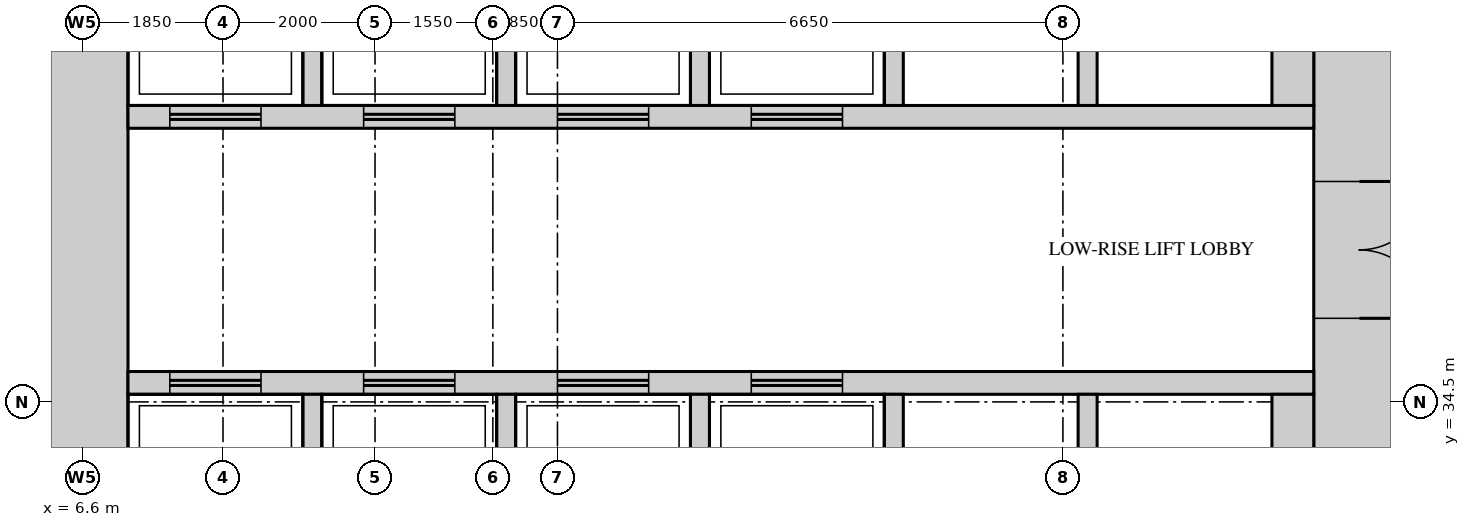
"""IFC4 building model, lengths in metres.
Left out: names, types, materials, properties, quantities, classifications, styles, units other than length and angle.
Written with IfcOpenShell. Run it as: python <this file> out.ifc"""

import sys

from ifc_helpers import new_model, si_unit, direction, frame, frame_2d, origin, place, context, subcontext, project, spatial, rectangle, extrude, source, transform, mapped, element, fill, save


model = new_model("IFC4")
c1 = context("Model", 3, precision=1e-05, world=origin(), true_north=direction((0.0, 1.0)))
c2 = subcontext(c1, "Body", "Model", "MODEL_VIEW")
j1 = project(units=[si_unit("LENGTHUNIT", "METRE"), si_unit("PLANEANGLEUNIT", "RADIAN")], contexts=[c1])
p1 = place(None, origin())
s1 = spatial("IfcSite", under=j1, at=p1, CompositionType="ELEMENT")
p2 = place(p1, origin())
s2 = spatial("IfcBuilding", under=s1, at=p2, CompositionType="ELEMENT")
p3 = place(p2, frame((0.0, 0.0, 37.5)))
s3 = spatial("IfcBuildingStorey", under=s2, at=p3, CompositionType="ELEMENT", Elevation=37.5)
m1 = source(origin(), c2, "Body", "SweptSolid", [
    extrude(rectangle(XDim=27.6, YDim=1.2, at=frame_2d((13.8, 0.0))), origin(), (0.0, 0.0, 1.0), 4.2),
])
p4 = place(p3, frame((23.4, 13.2, 0.0), z_axis=(0.0, 0.0, 1.0), x_axis=(0.0, 1.0, 0.0)))
e1 = element("IfcWall", 1, at=p4, inside=s3, PredefinedType="SHEAR", context=c2, shape_type="MappedRepresentation", body=[
    mapped(m1, transform((0.0, 0.0, 0.0))),
])
m2 = source(origin(), c2, "Body", "SweptSolid", [
    extrude(rectangle(XDim=1.8, YDim=2.1, at=frame_2d((0.9, 1.05))), frame((0.0, 0.61, 0.0), z_axis=(0.0, -1.0, 0.0), x_axis=(1.0, 0.0, 0.0)), (0.0, 0.0, 1.0), 1.22),
])
p5 = place(p4, frame((22.4, 0.0, 0.0)))
e2 = element("IfcOpeningElement", 2, at=p5, cuts=e1, PredefinedType="OPENING", context=c2, shape_type="MappedRepresentation", body=[
    mapped(m2, transform((0.0, 0.0, 0.0))),
])
m3 = source(origin(), c2, "Body", "SweptSolid", [
    extrude(rectangle(XDim=1.2, YDim=2.1, at=frame_2d((0.6, 1.05))), frame((0.0, 0.61, 0.0), z_axis=(0.0, -1.0, 0.0), x_axis=(1.0, 0.0, 0.0)), (0.0, 0.0, 1.0), 1.22),
])
p6 = place(p4, frame((13.65, 0.0, 0.0)))
e3 = element("IfcOpeningElement", 3, at=p6, cuts=e1, PredefinedType="OPENING", context=c2, shape_type="MappedRepresentation", body=[
    mapped(m3, transform((0.0, 0.0, 0.0))),
])
m4 = source(origin(), c2, "Body", "SweptSolid", [
    extrude(rectangle(XDim=0.9, YDim=2.1, at=frame_2d((0.45, 1.05))), frame((0.0, 0.61, 0.0), z_axis=(0.0, -1.0, 0.0), x_axis=(1.0, 0.0, 0.0)), (0.0, 0.0, 1.0), 1.22),
])
p7 = place(p4, frame((1.95, 0.0, 0.0)))
e4 = element("IfcOpeningElement", 4, at=p7, cuts=e1, PredefinedType="OPENING", context=c2, shape_type="MappedRepresentation", body=[
    mapped(m4, transform((0.0, 0.0, 0.0))),
])
p8 = place(p4, frame((6.8, 0.0, 0.0)))
e5 = element("IfcOpeningElement", 5, at=p8, cuts=e1, PredefinedType="OPENING", context=c2, shape_type="MappedRepresentation", body=[
    mapped(m4, transform((0.0, 0.0, 0.0))),
])
p9 = place(p3, frame((6.6, 13.2, 0.0), z_axis=(0.0, 0.0, 1.0), x_axis=(0.0, 1.0, 0.0)))
e6 = element("IfcWall", 6, at=p9, inside=s3, PredefinedType="SHEAR", context=c2, shape_type="MappedRepresentation", body=[
    mapped(m1, transform((0.0, 0.0, 0.0))),
])
m5 = source(origin(), c2, "Body", "SweptSolid", [
    extrude(rectangle(XDim=15.6, YDim=0.3, at=frame_2d((7.8, 0.0))), origin(), (0.0, 0.0, 1.0), 4.2),
])
p10 = place(p3, frame((7.2, 38.25, 0.0), z_axis=(0.0, 0.0, 1.0), x_axis=(1.0, 0.0, 0.0)))
e7 = element("IfcWall", 7, at=p10, inside=s3, PredefinedType="STANDARD", context=c2, shape_type="MappedRepresentation", body=[
    mapped(m5, transform((0.0, 0.0, 0.0))),
])
m6 = source(origin(), c2, "Body", "SweptSolid", [
    extrude(rectangle(XDim=1.2, YDim=2.1, at=frame_2d((0.6, 1.05))), frame((0.0, 0.16, 0.0), z_axis=(0.0, -1.0, 0.0), x_axis=(1.0, 0.0, 0.0)), (0.0, 0.0, 1.0), 0.32),
])
p11 = place(p10, frame((0.55, 0.0, 0.0)))
e8 = element("IfcOpeningElement", 8, at=p11, cuts=e7, PredefinedType="OPENING", context=c2, shape_type="MappedRepresentation", body=[
    mapped(m6, transform((0.0, 0.0, 0.0))),
])
p12 = place(p10, frame((3.1, 0.0, 0.0)))
e9 = element("IfcOpeningElement", 9, at=p12, cuts=e7, PredefinedType="OPENING", context=c2, shape_type="MappedRepresentation", body=[
    mapped(m6, transform((0.0, 0.0, 0.0))),
])
p13 = place(p10, frame((5.65, 0.0, 0.0)))
e10 = element("IfcOpeningElement", 10, at=p13, cuts=e7, PredefinedType="OPENING", context=c2, shape_type="MappedRepresentation", body=[
    mapped(m6, transform((0.0, 0.0, 0.0))),
])
p14 = place(p10, frame((8.2, 0.0, 0.0)))
e11 = element("IfcOpeningElement", 11, at=p14, cuts=e7, PredefinedType="OPENING", context=c2, shape_type="MappedRepresentation", body=[
    mapped(m6, transform((0.0, 0.0, 0.0))),
])
p15 = place(p3, frame((7.2, 34.75, 0.0), z_axis=(0.0, 0.0, 1.0), x_axis=(1.0, 0.0, 0.0)))
e12 = element("IfcWall", 12, at=p15, inside=s3, PredefinedType="STANDARD", context=c2, shape_type="MappedRepresentation", body=[
    mapped(m5, transform((0.0, 0.0, 0.0))),
])
p16 = place(p15, frame((0.55, 0.0, 0.0)))
e13 = element("IfcOpeningElement", 13, at=p16, cuts=e12, PredefinedType="OPENING", context=c2, shape_type="MappedRepresentation", body=[
    mapped(m6, transform((0.0, 0.0, 0.0))),
])
p17 = place(p15, frame((3.1, 0.0, 0.0)))
e14 = element("IfcOpeningElement", 14, at=p17, cuts=e12, PredefinedType="OPENING", context=c2, shape_type="MappedRepresentation", body=[
    mapped(m6, transform((0.0, 0.0, 0.0))),
])
p18 = place(p15, frame((5.65, 0.0, 0.0)))
e15 = element("IfcOpeningElement", 15, at=p18, cuts=e12, PredefinedType="OPENING", context=c2, shape_type="MappedRepresentation", body=[
    mapped(m6, transform((0.0, 0.0, 0.0))),
])
p19 = place(p15, frame((8.2, 0.0, 0.0)))
e16 = element("IfcOpeningElement", 16, at=p19, cuts=e12, PredefinedType="OPENING", context=c2, shape_type="MappedRepresentation", body=[
    mapped(m6, transform((0.0, 0.0, 0.0))),
])
m7 = source(origin(), c2, "Body", "SweptSolid", [
    extrude(rectangle(XDim=2.4, YDim=0.25, at=frame_2d((1.2, 0.0))), origin(), (0.0, 0.0, 1.0), 4.2),
])
for number, where, z_axis, x_axis in (
    (17, (9.625, 38.4, 0.0), (0.0, 0.0, 1.0), (0.0, 1.0, 0.0)),
    (18, (12.175, 38.4, 0.0), (0.0, 0.0, 1.0), (0.0, 1.0, 0.0)),
    (19, (14.725, 38.4, 0.0), (0.0, 0.0, 1.0), (0.0, 1.0, 0.0)),
    (20, (17.275, 38.4, 0.0), (0.0, 0.0, 1.0), (0.0, 1.0, 0.0)),
    (21, (19.825, 38.4, 0.0), (0.0, 0.0, 1.0), (0.0, 1.0, 0.0)),
):
    element("IfcWall", number, at=place(p3, frame(where, z_axis=z_axis, x_axis=x_axis)), inside=s3, PredefinedType="STANDARD", context=c2, shape_type="MappedRepresentation", body=[
        mapped(m7, transform((0.0, 0.0, 0.0))),
    ])
m8 = source(origin(), c2, "Body", "SweptSolid", [
    extrude(rectangle(XDim=2.4, YDim=0.55, at=frame_2d((1.2, 0.0))), origin(), (0.0, 0.0, 1.0), 4.2),
])
p20 = place(p3, frame((22.525, 38.4, 0.0), z_axis=(0.0, 0.0, 1.0), x_axis=(0.0, 1.0, 0.0)))
e22 = element("IfcWall", 22, at=p20, inside=s3, PredefinedType="STANDARD", context=c2, shape_type="MappedRepresentation", body=[
    mapped(m8, transform((0.0, 0.0, 0.0))),
])
for number, where, z_axis, x_axis in (
    (23, (9.625, 32.2, 0.0), (0.0, 0.0, 1.0), (0.0, 1.0, 0.0)),
    (24, (12.175, 32.2, 0.0), (0.0, 0.0, 1.0), (0.0, 1.0, 0.0)),
    (25, (14.725, 32.2, 0.0), (0.0, 0.0, 1.0), (0.0, 1.0, 0.0)),
    (26, (17.275, 32.2, 0.0), (0.0, 0.0, 1.0), (0.0, 1.0, 0.0)),
    (27, (19.825, 32.2, 0.0), (0.0, 0.0, 1.0), (0.0, 1.0, 0.0)),
):
    element("IfcWall", number, at=place(p3, frame(where, z_axis=z_axis, x_axis=x_axis)), inside=s3, PredefinedType="STANDARD", context=c2, shape_type="MappedRepresentation", body=[
        mapped(m7, transform((0.0, 0.0, 0.0))),
    ])
p21 = place(p3, frame((22.525, 32.2, 0.0), z_axis=(0.0, 0.0, 1.0), x_axis=(0.0, 1.0, 0.0)))
e28 = element("IfcWall", 28, at=p21, inside=s3, PredefinedType="STANDARD", context=c2, shape_type="MappedRepresentation", body=[
    mapped(m8, transform((0.0, 0.0, 0.0))),
])
m9 = source(origin(), c2, "Body", "SweptSolid", [
    extrude(rectangle(XDim=1.8, YDim=2.1, at=frame_2d((0.9, 1.05))), frame((0.0, 0.55, 0.0), z_axis=(0.0, -1.0, 0.0), x_axis=(1.0, 0.0, 0.0)), (0.0, 0.0, 1.0), 1.1),
])
p22 = place(p5, origin())
e29 = element("IfcDoor", 29, at=p22, inside=s3, OperationType="DOUBLE_DOOR_SINGLE_SWING", PredefinedType="DOOR", context=c2, shape_type="MappedRepresentation", body=[
    mapped(m9, transform((0.0, 0.0, 0.0))),
])
fill(e2, e29)
m10 = source(origin(), c2, "Body", "SweptSolid", [
    extrude(rectangle(XDim=1.2, YDim=2.1, at=frame_2d((0.6, 1.05))), frame((0.0, 0.025, 0.0), z_axis=(0.0, -1.0, 0.0), x_axis=(1.0, 0.0, 0.0)), (0.0, 0.0, 1.0), 0.05),
])
p23 = place(p16, origin())
e30 = element("IfcDoor", 30, at=p23, inside=s3, OperationType="DOUBLE_DOOR_SLIDING", PredefinedType="DOOR", context=c2, shape_type="MappedRepresentation", body=[
    mapped(m10, transform((0.0, 0.0, 0.0))),
])
fill(e13, e30)
p24 = place(p17, origin())
e31 = element("IfcDoor", 31, at=p24, inside=s3, OperationType="DOUBLE_DOOR_SLIDING", PredefinedType="DOOR", context=c2, shape_type="MappedRepresentation", body=[
    mapped(m10, transform((0.0, 0.0, 0.0))),
])
fill(e14, e31)
p25 = place(p18, origin())
e32 = element("IfcDoor", 32, at=p25, inside=s3, OperationType="DOUBLE_DOOR_SLIDING", PredefinedType="DOOR", context=c2, shape_type="MappedRepresentation", body=[
    mapped(m10, transform((0.0, 0.0, 0.0))),
])
fill(e15, e32)
p26 = place(p19, origin())
e33 = element("IfcDoor", 33, at=p26, inside=s3, OperationType="DOUBLE_DOOR_SLIDING", PredefinedType="DOOR", context=c2, shape_type="MappedRepresentation", body=[
    mapped(m10, transform((0.0, 0.0, 0.0))),
])
fill(e16, e33)
p27 = place(p11, origin())
e34 = element("IfcDoor", 34, at=p27, inside=s3, OperationType="DOUBLE_DOOR_SLIDING", PredefinedType="DOOR", context=c2, shape_type="MappedRepresentation", body=[
    mapped(m10, transform((0.0, 0.0, 0.0))),
])
fill(e8, e34)
p28 = place(p12, origin())
e35 = element("IfcDoor", 35, at=p28, inside=s3, OperationType="DOUBLE_DOOR_SLIDING", PredefinedType="DOOR", context=c2, shape_type="MappedRepresentation", body=[
    mapped(m10, transform((0.0, 0.0, 0.0))),
])
fill(e9, e35)
p29 = place(p13, origin())
e36 = element("IfcDoor", 36, at=p29, inside=s3, OperationType="DOUBLE_DOOR_SLIDING", PredefinedType="DOOR", context=c2, shape_type="MappedRepresentation", body=[
    mapped(m10, transform((0.0, 0.0, 0.0))),
])
fill(e10, e36)
p30 = place(p14, origin())
e37 = element("IfcDoor", 37, at=p30, inside=s3, OperationType="DOUBLE_DOOR_SLIDING", PredefinedType="DOOR", context=c2, shape_type="MappedRepresentation", body=[
    mapped(m10, transform((0.0, 0.0, 0.0))),
])
fill(e11, e37)
save(model, sys.argv[1])
